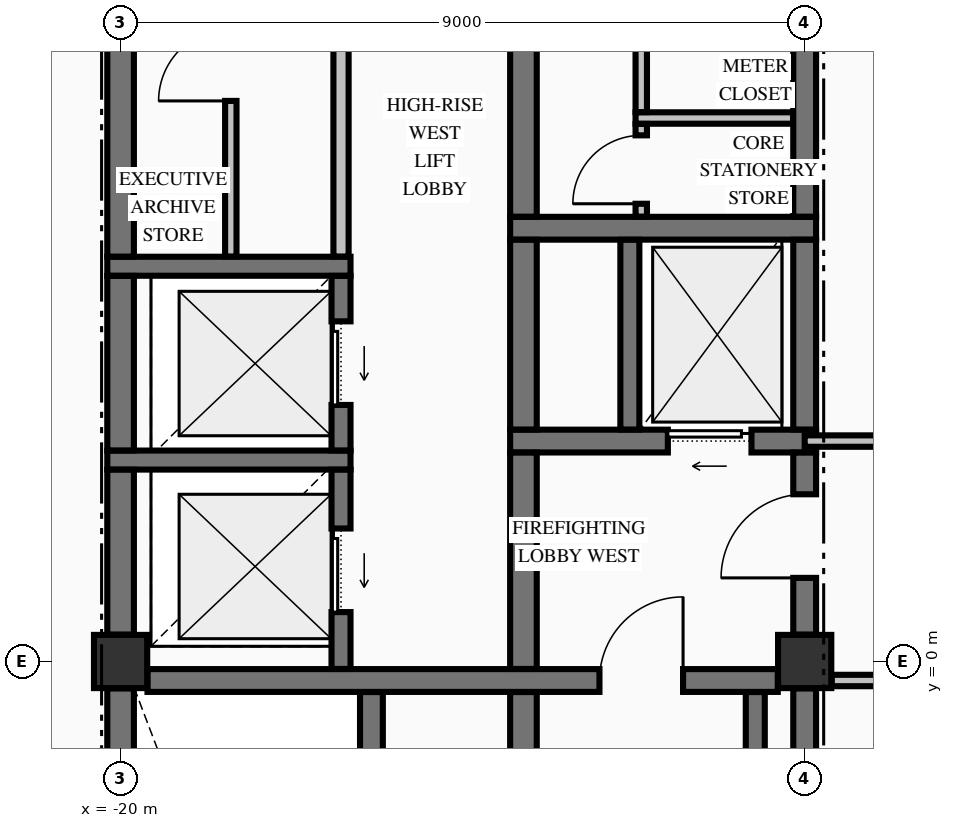
"""IFC4 building model, lengths in metres.
Left out: names, types, materials, properties, quantities, classifications, styles, units other than length and angle.
Written with IfcOpenShell. Run it as: python <this file> out.ifc"""

import sys

from ifc_helpers import new_model, si_unit, direction, frame, frame_2d, origin, origin_2d, place, context, subcontext, project, spatial, rectangle, extrude, element, fill, save


model = new_model("IFC4")
c1 = context("Model", 3, precision=1e-05, world=origin(), true_north=direction((0.0, 1.0)))
c2 = subcontext(c1, "Body", "Model", "MODEL_VIEW")
j1 = project(units=[si_unit("LENGTHUNIT", "METRE"), si_unit("PLANEANGLEUNIT", "RADIAN")], contexts=[c1])
p1 = place(None, origin())
s1 = spatial("IfcSite", under=j1, at=p1, CompositionType="ELEMENT")
p2 = place(p1, origin())
s2 = spatial("IfcBuilding", under=s1, at=p2, CompositionType="ELEMENT")
p3 = place(p2, frame((0.0, 0.0, 274.32)))
s3 = spatial("IfcBuildingStorey", under=s2, at=p3, CompositionType="ELEMENT", Elevation=274.32)
for number, where, z_axis, x_axis in (
    (1, (-11.0, 0.0, -0.25), (0.0, 0.0, 1.0), (1.0, 0.0, 0.0)),
    (2, (-20.0, 0.0, -0.25), (0.0, 0.0, 1.0), (1.0, 0.0, 0.0)),
):
    element("IfcColumn", number, at=place(p3, frame(where, z_axis=z_axis, x_axis=x_axis)), inside=s3, PredefinedType="COLUMN", context=c2, shape_type="SweptSolid", body=[
        extrude(rectangle(XDim=0.7, YDim=0.7, at=origin_2d()), origin(), (0.0, 0.0, 1.0), 3.565),
    ])
p4 = place(p3, frame((-19.646, -0.25, 0.0), z_axis=(0.0, 0.0, 1.0), x_axis=(1.0, 0.0, 0.0)))
e3 = element("IfcWall", 3, at=p4, inside=s3, PredefinedType="SHEAR", context=c2, shape_type="SweptSolid", body=[
    extrude(rectangle(XDim=8.292, YDim=0.3, at=frame_2d((4.146, 0.0))), origin(), (0.0, 0.0, 1.0), 3.315),
])
p5 = place(p4, frame((5.946, 0.0, 0.0)))
e4 = element("IfcOpeningElement", 4, at=p5, cuts=e3, PredefinedType="OPENING", context=c2, shape_type="SweptSolid", body=[
    extrude(rectangle(XDim=1.1, YDim=2.15, at=frame_2d((0.55, 1.075))), frame((0.0, 0.16, 0.0), z_axis=(0.0, -1.0, 0.0), x_axis=(1.0, 0.0, 0.0)), (0.0, 0.0, 1.0), 0.32),
])
p6 = place(p3, frame((-20.175, 2.65, 0.0), z_axis=(0.0, 0.0, 1.0), x_axis=(1.0, 0.0, 0.0)))
e5 = element("IfcWall", 5, at=p6, inside=s3, PredefinedType="SOLIDWALL", context=c2, shape_type="SweptSolid", body=[
    extrude(rectangle(XDim=3.2, YDim=0.25, at=frame_2d((1.6, 0.0))), origin(), (0.0, 0.0, 1.0), 3.315),
])
p7 = place(p3, frame((-14.875, 2.9, 0.0), z_axis=(0.0, 0.0, 1.0), x_axis=(1.0, 0.0, 0.0)))
e6 = element("IfcWall", 6, at=p7, inside=s3, PredefinedType="SHEAR", context=c2, shape_type="SweptSolid", body=[
    extrude(rectangle(XDim=4.025, YDim=0.3, at=frame_2d((2.012, 0.0))), origin(), (0.0, 0.0, 1.0), 3.315),
])
p8 = place(p7, frame((2.075, 0.0, 0.0)))
e7 = element("IfcOpeningElement", 7, at=p8, cuts=e6, PredefinedType="OPENING", context=c2, shape_type="SweptSolid", body=[
    extrude(rectangle(XDim=1.1, YDim=2.2, at=frame_2d((0.55, 1.1))), frame((0.0, 0.16, 0.0), z_axis=(0.0, -1.0, 0.0), x_axis=(1.0, 0.0, 0.0)), (0.0, 0.0, 1.0), 0.32),
])
p9 = place(p3, frame((-20.175, 5.2, 0.0), z_axis=(0.0, 0.0, 1.0), x_axis=(1.0, 0.0, 0.0)))
e8 = element("IfcWall", 8, at=p9, inside=s3, PredefinedType="SOLIDWALL", context=c2, shape_type="SweptSolid", body=[
    extrude(rectangle(XDim=3.2, YDim=0.25, at=frame_2d((1.6, 0.0))), origin(), (0.0, 0.0, 1.0), 3.315),
])
p10 = place(p3, frame((-14.875, 5.7, 0.0), z_axis=(0.0, 0.0, 1.0), x_axis=(1.0, 0.0, 0.0)))
e9 = element("IfcWall", 9, at=p10, inside=s3, PredefinedType="SHEAR", context=c2, shape_type="SweptSolid", body=[
    extrude(rectangle(XDim=4.025, YDim=0.3, at=frame_2d((2.012, 0.0))), origin(), (0.0, 0.0, 1.0), 3.315),
])
p11 = place(p3, frame((-10.644, -0.25, 0.0), z_axis=(0.0, 0.0, 1.0), x_axis=(1.0, 0.0, 0.0)))
e10 = element("IfcWall", 10, at=p11, inside=s3, PredefinedType="PARTITIONING", context=c2, shape_type="SweptSolid", body=[
    extrude(rectangle(XDim=21.288, YDim=0.15, at=frame_2d((10.644, 0.0))), origin(), (0.0, 0.0, 1.0), 3.315),
])
p12 = place(p11, frame((8.294, 0.0, 0.0)))
e11 = element("IfcOpeningElement", 11, at=p12, cuts=e10, PredefinedType="OPENING", context=c2, shape_type="SweptSolid", body=[
    extrude(rectangle(XDim=1.1, YDim=2.15, at=frame_2d((0.55, 1.075))), frame((0.0, 0.085, 0.0), z_axis=(0.0, -1.0, 0.0), x_axis=(1.0, 0.0, 0.0)), (0.0, 0.0, 1.0), 0.17),
])
p13 = place(p11, frame((3.169, 0.0, 0.0)))
e12 = element("IfcOpeningElement", 12, at=p13, cuts=e10, PredefinedType="OPENING", context=c2, shape_type="SweptSolid", body=[
    extrude(rectangle(XDim=1.05, YDim=2.15, at=frame_2d((0.525, 1.075))), frame((0.0, 0.085, 0.0), z_axis=(0.0, -1.0, 0.0), x_axis=(1.0, 0.0, 0.0)), (0.0, 0.0, 1.0), 0.17),
])
p14 = place(p11, frame((15.319, 0.0, 0.0)))
e13 = element("IfcOpeningElement", 13, at=p14, cuts=e10, PredefinedType="OPENING", context=c2, shape_type="SweptSolid", body=[
    extrude(rectangle(XDim=0.95, YDim=2.15, at=frame_2d((0.475, 1.075))), frame((0.0, 0.085, 0.0), z_axis=(0.0, -1.0, 0.0), x_axis=(1.0, 0.0, 0.0)), (0.0, 0.0, 1.0), 0.17),
])
p15 = place(p3, frame((-11.0, 2.9, 0.0), z_axis=(0.0, 0.0, 1.0), x_axis=(1.0, 0.0, 0.0)))
e14 = element("IfcWall", 14, at=p15, inside=s3, PredefinedType="PARTITIONING", context=c2, shape_type="SweptSolid", body=[
    extrude(rectangle(XDim=22.0, YDim=0.15, at=frame_2d((11.0, 0.0))), origin(), (0.0, 0.0, 1.0), 3.315),
])
p16 = place(p15, frame((8.65, 0.0, 0.0)))
e15 = element("IfcOpeningElement", 15, at=p16, cuts=e14, PredefinedType="OPENING", context=c2, shape_type="SweptSolid", body=[
    extrude(rectangle(XDim=1.1, YDim=2.15, at=frame_2d((0.55, 1.075))), frame((0.0, 0.085, 0.0), z_axis=(0.0, -1.0, 0.0), x_axis=(1.0, 0.0, 0.0)), (0.0, 0.0, 1.0), 0.17),
])
p17 = place(p15, frame((3.525, 0.0, 0.0)))
e16 = element("IfcOpeningElement", 16, at=p17, cuts=e14, PredefinedType="OPENING", context=c2, shape_type="SweptSolid", body=[
    extrude(rectangle(XDim=1.05, YDim=2.15, at=frame_2d((0.525, 1.075))), frame((0.0, 0.085, 0.0), z_axis=(0.0, -1.0, 0.0), x_axis=(1.0, 0.0, 0.0)), (0.0, 0.0, 1.0), 0.17),
])
p18 = place(p15, frame((12.225, 0.0, 0.0)))
e17 = element("IfcOpeningElement", 17, at=p18, cuts=e14, PredefinedType="OPENING", context=c2, shape_type="SweptSolid", body=[
    extrude(rectangle(XDim=0.95, YDim=2.15, at=frame_2d((0.475, 1.075))), frame((0.0, 0.085, 0.0), z_axis=(0.0, -1.0, 0.0), x_axis=(1.0, 0.0, 0.0)), (0.0, 0.0, 1.0), 0.17),
])
p19 = place(p15, frame((18.075, 0.0, 0.0)))
e18 = element("IfcOpeningElement", 18, at=p19, cuts=e14, PredefinedType="OPENING", context=c2, shape_type="SweptSolid", body=[
    extrude(rectangle(XDim=0.95, YDim=2.15, at=frame_2d((0.475, 1.075))), frame((0.0, 0.085, 0.0), z_axis=(0.0, -1.0, 0.0), x_axis=(1.0, 0.0, 0.0)), (0.0, 0.0, 1.0), 0.17),
])
p20 = place(p3, frame((-13.225, 7.15, 0.0), z_axis=(0.0, 0.0, 1.0), x_axis=(1.0, 0.0, 0.0)))
e19 = element("IfcWall", 19, at=p20, inside=s3, PredefinedType="PARTITIONING", context=c2, shape_type="SweptSolid", body=[
    extrude(rectangle(XDim=2.072, YDim=0.15, at=frame_2d((1.036, 0.0))), origin(), (0.0, 0.0, 1.0), 3.315),
])
p21 = place(p3, frame((-20.0, -9.596, 0.0), z_axis=(0.0, 0.0, 1.0), x_axis=(0.0, 1.0, 0.0)))
e20 = element("IfcWall", 20, at=p21, inside=s3, PredefinedType="SHEAR", context=c2, shape_type="SweptSolid", body=[
    extrude(rectangle(XDim=9.242, YDim=0.35, at=frame_2d((4.621, 0.0))), origin(), (0.0, 0.0, 1.0), 3.315),
])
p22 = place(p3, frame((-20.0, 0.354, 0.0), z_axis=(0.0, 0.0, 1.0), x_axis=(0.0, 1.0, 0.0)))
e21 = element("IfcWall", 21, at=p22, inside=s3, PredefinedType="SHEAR", context=c2, shape_type="SweptSolid", body=[
    extrude(rectangle(XDim=2.169, YDim=0.35, at=frame_2d((1.084, 0.0))), origin(), (0.0, 0.0, 1.0), 3.315),
])
p23 = place(p3, frame((-20.0, 2.777, 0.0), z_axis=(0.0, 0.0, 1.0), x_axis=(0.0, 1.0, 0.0)))
e22 = element("IfcWall", 22, at=p23, inside=s3, PredefinedType="SHEAR", context=c2, shape_type="SweptSolid", body=[
    extrude(rectangle(XDim=2.296, YDim=0.35, at=frame_2d((1.148, 0.0))), origin(), (0.0, 0.0, 1.0), 3.315),
])
p24 = place(p3, frame((-20.0, 5.327, 0.0), z_axis=(0.0, 0.0, 1.0), x_axis=(0.0, 1.0, 0.0)))
e23 = element("IfcWall", 23, at=p24, inside=s3, PredefinedType="SHEAR", context=c2, shape_type="SweptSolid", body=[
    extrude(rectangle(XDim=4.819, YDim=0.35, at=frame_2d((2.41, 0.0))), origin(), (0.0, 0.0, 1.0), 3.315),
])
p25 = place(p3, frame((-17.1, -0.098, 0.0), z_axis=(0.0, 0.0, 1.0), x_axis=(0.0, 1.0, 0.0)))
e24 = element("IfcWall", 24, at=p25, inside=s3, PredefinedType="SOLIDWALL", context=c2, shape_type="SweptSolid", body=[
    extrude(rectangle(XDim=2.621, YDim=0.25, at=frame_2d((1.311, 0.0))), origin(), (0.0, 0.0, 1.0), 3.315),
])
p26 = place(p25, frame((0.748, 0.0, 0.0)))
e25 = element("IfcOpeningElement", 25, at=p26, cuts=e24, PredefinedType="OPENING", context=c2, shape_type="SweptSolid", body=[
    extrude(rectangle(XDim=1.1, YDim=2.2, at=frame_2d((0.55, 1.1))), frame((0.0, 0.135, 0.0), z_axis=(0.0, -1.0, 0.0), x_axis=(1.0, 0.0, 0.0)), (0.0, 0.0, 1.0), 0.27),
])
p27 = place(p3, frame((-17.1, 2.777, 0.0), z_axis=(0.0, 0.0, 1.0), x_axis=(0.0, 1.0, 0.0)))
e26 = element("IfcWall", 26, at=p27, inside=s3, PredefinedType="SOLIDWALL", context=c2, shape_type="SweptSolid", body=[
    extrude(rectangle(XDim=2.296, YDim=0.25, at=frame_2d((1.148, 0.0))), origin(), (0.0, 0.0, 1.0), 3.315),
])
p28 = place(p27, frame((0.598, 0.0, 0.0)))
e27 = element("IfcOpeningElement", 27, at=p28, cuts=e26, PredefinedType="OPENING", context=c2, shape_type="SweptSolid", body=[
    extrude(rectangle(XDim=1.1, YDim=2.2, at=frame_2d((0.55, 1.1))), frame((0.0, 0.135, 0.0), z_axis=(0.0, -1.0, 0.0), x_axis=(1.0, 0.0, 0.0)), (0.0, 0.0, 1.0), 0.27),
])
p29 = place(p3, frame((-16.7, -9.773, 0.0), z_axis=(0.0, 0.0, 1.0), x_axis=(0.0, 1.0, 0.0)))
e28 = element("IfcWall", 28, at=p29, inside=s3, PredefinedType="SHEAR", context=c2, shape_type="SweptSolid", body=[
    extrude(rectangle(XDim=9.371, YDim=0.3, at=frame_2d((4.686, 0.0))), origin(), (0.0, 0.0, 1.0), 3.315),
])
p30 = place(p3, frame((-14.7, -9.773, 0.0), z_axis=(0.0, 0.0, 1.0), x_axis=(0.0, 1.0, 0.0)))
e29 = element("IfcWall", 29, at=p30, inside=s3, PredefinedType="SHEAR", context=c2, shape_type="SweptSolid", body=[
    extrude(rectangle(XDim=9.371, YDim=0.35, at=frame_2d((4.686, 0.0))), origin(), (0.0, 0.0, 1.0), 3.315),
])
p31 = place(p3, frame((-14.7, -0.098, 0.0), z_axis=(0.0, 0.0, 1.0), x_axis=(0.0, 1.0, 0.0)))
e30 = element("IfcWall", 30, at=p31, inside=s3, PredefinedType="SHEAR", context=c2, shape_type="SweptSolid", body=[
    extrude(rectangle(XDim=2.846, YDim=0.35, at=frame_2d((1.423, 0.0))), origin(), (0.0, 0.0, 1.0), 3.315),
])
p32 = place(p3, frame((-14.7, 3.052, 0.0), z_axis=(0.0, 0.0, 1.0), x_axis=(0.0, 1.0, 0.0)))
e31 = element("IfcWall", 31, at=p32, inside=s3, PredefinedType="SHEAR", context=c2, shape_type="SweptSolid", body=[
    extrude(rectangle(XDim=2.496, YDim=0.35, at=frame_2d((1.248, 0.0))), origin(), (0.0, 0.0, 1.0), 3.315),
])
p33 = place(p3, frame((-14.7, 5.852, 0.0), z_axis=(0.0, 0.0, 1.0), x_axis=(0.0, 1.0, 0.0)))
e32 = element("IfcWall", 32, at=p33, inside=s3, PredefinedType="SHEAR", context=c2, shape_type="SweptSolid", body=[
    extrude(rectangle(XDim=4.471, YDim=0.35, at=frame_2d((2.235, 0.0))), origin(), (0.0, 0.0, 1.0), 3.315),
])
p34 = place(p3, frame((-13.3, 3.052, 0.0), z_axis=(0.0, 0.0, 1.0), x_axis=(0.0, 1.0, 0.0)))
e33 = element("IfcWall", 33, at=p34, inside=s3, PredefinedType="SOLIDWALL", context=c2, shape_type="SweptSolid", body=[
    extrude(rectangle(XDim=2.496, YDim=0.25, at=frame_2d((1.248, 0.0))), origin(), (0.0, 0.0, 1.0), 3.315),
])
p35 = place(p3, frame((-11.65, -9.798, 0.0), z_axis=(0.0, 0.0, 1.0), x_axis=(0.0, 1.0, 0.0)))
e34 = element("IfcWall", 34, at=p35, inside=s3, PredefinedType="SOLIDWALL", context=c2, shape_type="SweptSolid", body=[
    extrude(rectangle(XDim=9.396, YDim=0.25, at=frame_2d((4.698, 0.0))), origin(), (0.0, 0.0, 1.0), 3.315),
])
p36 = place(p3, frame((-11.0, -9.596, 0.0), z_axis=(0.0, 0.0, 1.0), x_axis=(0.0, 1.0, 0.0)))
e35 = element("IfcWall", 35, at=p36, inside=s3, PredefinedType="SHEAR", context=c2, shape_type="SweptSolid", body=[
    extrude(rectangle(XDim=9.242, YDim=0.3, at=frame_2d((4.621, 0.0))), origin(), (0.0, 0.0, 1.0), 3.315),
])
p37 = place(p3, frame((-11.0, 0.354, 0.0), z_axis=(0.0, 0.0, 1.0), x_axis=(0.0, 1.0, 0.0)))
e36 = element("IfcWall", 36, at=p37, inside=s3, PredefinedType="SHEAR", context=c2, shape_type="SweptSolid", body=[
    extrude(rectangle(XDim=2.394, YDim=0.3, at=frame_2d((1.197, 0.0))), origin(), (0.0, 0.0, 1.0), 3.315),
])
p38 = place(p37, frame((0.746, 0.0, 0.0)))
e37 = element("IfcOpeningElement", 37, at=p38, cuts=e36, PredefinedType="OPENING", context=c2, shape_type="SweptSolid", body=[
    extrude(rectangle(XDim=1.1, YDim=2.15, at=frame_2d((0.55, 1.075))), frame((0.0, 0.16, 0.0), z_axis=(0.0, -1.0, 0.0), x_axis=(1.0, 0.0, 0.0)), (0.0, 0.0, 1.0), 0.32),
])
p39 = place(p3, frame((-11.0, 3.052, 0.0), z_axis=(0.0, 0.0, 1.0), x_axis=(0.0, 1.0, 0.0)))
e38 = element("IfcWall", 38, at=p39, inside=s3, PredefinedType="SHEAR", context=c2, shape_type="SweptSolid", body=[
    extrude(rectangle(XDim=2.496, YDim=0.3, at=frame_2d((1.248, 0.0))), origin(), (0.0, 0.0, 1.0), 3.315),
])
p40 = place(p3, frame((-11.0, 5.852, 0.0), z_axis=(0.0, 0.0, 1.0), x_axis=(0.0, 1.0, 0.0)))
e39 = element("IfcWall", 39, at=p40, inside=s3, PredefinedType="SHEAR", context=c2, shape_type="SweptSolid", body=[
    extrude(rectangle(XDim=4.294, YDim=0.3, at=frame_2d((2.147, 0.0))), origin(), (0.0, 0.0, 1.0), 3.315),
])
p41 = place(p3, frame((-18.55, 5.328, 0.0), z_axis=(0.0, 0.0, 1.0), x_axis=(0.0, 1.0, 0.0)))
e40 = element("IfcWall", 40, at=p41, inside=s3, PredefinedType="PARTITIONING", context=c2, shape_type="SweptSolid", body=[
    extrude(rectangle(XDim=4.994, YDim=0.15, at=frame_2d((2.497, 0.0))), origin(), (0.0, 0.0, 1.0), 3.315),
])
p42 = place(p41, frame((2.047, 0.0, 0.0)))
e41 = element("IfcOpeningElement", 41, at=p42, cuts=e40, PredefinedType="OPENING", context=c2, shape_type="SweptSolid", body=[
    extrude(rectangle(XDim=0.95, YDim=2.15, at=frame_2d((0.475, 1.075))), frame((0.0, 0.085, 0.0), z_axis=(0.0, -1.0, 0.0), x_axis=(1.0, 0.0, 0.0)), (0.0, 0.0, 1.0), 0.17),
])
p43 = place(p3, frame((-17.1, 5.328, 0.0), z_axis=(0.0, 0.0, 1.0), x_axis=(0.0, 1.0, 0.0)))
e42 = element("IfcWall", 42, at=p43, inside=s3, PredefinedType="PARTITIONING", context=c2, shape_type="SweptSolid", body=[
    extrude(rectangle(XDim=4.994, YDim=0.2, at=frame_2d((2.497, 0.0))), origin(), (0.0, 0.0, 1.0), 3.315),
])
p44 = place(p3, frame((-13.15, 5.853, 0.0), z_axis=(0.0, 0.0, 1.0), x_axis=(0.0, 1.0, 0.0)))
e43 = element("IfcWall", 43, at=p44, inside=s3, PredefinedType="PARTITIONING", context=c2, shape_type="SweptSolid", body=[
    extrude(rectangle(XDim=1.219, YDim=0.15, at=frame_2d((0.609, 0.0))), origin(), (0.0, 0.0, 1.0), 3.315),
])
p45 = place(p44, frame((0.169, 0.0, 0.0)))
e44 = element("IfcOpeningElement", 44, at=p45, cuts=e43, PredefinedType="OPENING", context=c2, shape_type="SweptSolid", body=[
    extrude(rectangle(XDim=0.9, YDim=2.15, at=frame_2d((0.45, 1.075))), frame((0.0, 0.085, 0.0), z_axis=(0.0, -1.0, 0.0), x_axis=(1.0, 0.0, 0.0)), (0.0, 0.0, 1.0), 0.17),
])
p46 = place(p3, frame((-13.15, 7.228, 0.0), z_axis=(0.0, 0.0, 1.0), x_axis=(0.0, 1.0, 0.0)))
e45 = element("IfcWall", 45, at=p46, inside=s3, PredefinedType="PARTITIONING", context=c2, shape_type="SweptSolid", body=[
    extrude(rectangle(XDim=3.119, YDim=0.15, at=frame_2d((1.56, 0.0))), origin(), (0.0, 0.0, 1.0), 3.315),
])
p47 = place(p46, frame((1.097, 0.0, 0.0)))
e46 = element("IfcOpeningElement", 46, at=p47, cuts=e45, PredefinedType="OPENING", context=c2, shape_type="SweptSolid", body=[
    extrude(rectangle(XDim=0.95, YDim=2.15, at=frame_2d((0.475, 1.075))), frame((0.0, 0.085, 0.0), z_axis=(0.0, -1.0, 0.0), x_axis=(1.0, 0.0, 0.0)), (0.0, 0.0, 1.0), 0.17),
])
p48 = place(p5, origin())
e47 = element("IfcDoor", 47, at=p48, inside=s3, OperationType="SINGLE_SWING_RIGHT", PredefinedType="DOOR", context=c2, shape_type="SweptSolid", body=[
    extrude(rectangle(XDim=1.1, YDim=2.15, at=frame_2d((0.55, 1.075))), frame((0.0, 0.025, 0.0), z_axis=(0.0, -1.0, 0.0), x_axis=(1.0, 0.0, 0.0)), (0.0, 0.0, 1.0), 0.05),
])
fill(e4, e47)
p49 = place(p38, origin())
e48 = element("IfcDoor", 48, at=p49, inside=s3, OperationType="SINGLE_SWING_LEFT", PredefinedType="DOOR", context=c2, shape_type="SweptSolid", body=[
    extrude(rectangle(XDim=1.1, YDim=2.15, at=frame_2d((0.55, 1.075))), frame((0.0, 0.025, 0.0), z_axis=(0.0, -1.0, 0.0), x_axis=(1.0, 0.0, 0.0)), (0.0, 0.0, 1.0), 0.05),
])
fill(e37, e48)
p50 = place(p8, origin())
e49 = element("IfcDoor", 49, at=p50, inside=s3, OperationType="SLIDING_TO_LEFT", PredefinedType="DOOR", context=c2, shape_type="SweptSolid", body=[
    extrude(rectangle(XDim=1.1, YDim=2.2, at=frame_2d((0.55, 1.1))), frame((0.0, 0.025, 0.0), z_axis=(0.0, -1.0, 0.0), x_axis=(1.0, 0.0, 0.0)), (0.0, 0.0, 1.0), 0.05),
])
fill(e7, e49)
p51 = place(p45, origin())
e50 = element("IfcDoor", 50, at=p51, inside=s3, OperationType="SINGLE_SWING_LEFT", PredefinedType="DOOR", context=c2, shape_type="SweptSolid", body=[
    extrude(rectangle(XDim=0.9, YDim=2.15, at=frame_2d((0.45, 1.075))), frame((0.0, 0.025, 0.0), z_axis=(0.0, -1.0, 0.0), x_axis=(1.0, 0.0, 0.0)), (0.0, 0.0, 1.0), 0.05),
])
fill(e44, e50)
p52 = place(p26, origin())
e51 = element("IfcDoor", 51, at=p52, inside=s3, OperationType="SLIDING_TO_LEFT", PredefinedType="DOOR", context=c2, shape_type="SweptSolid", body=[
    extrude(rectangle(XDim=1.1, YDim=2.2, at=frame_2d((0.55, 1.1))), frame((0.0, 0.025, 0.0), z_axis=(0.0, -1.0, 0.0), x_axis=(1.0, 0.0, 0.0)), (0.0, 0.0, 1.0), 0.05),
])
fill(e25, e51)
p53 = place(p28, origin())
e52 = element("IfcDoor", 52, at=p53, inside=s3, OperationType="SLIDING_TO_LEFT", PredefinedType="DOOR", context=c2, shape_type="SweptSolid", body=[
    extrude(rectangle(XDim=1.1, YDim=2.2, at=frame_2d((0.55, 1.1))), frame((0.0, 0.025, 0.0), z_axis=(0.0, -1.0, 0.0), x_axis=(1.0, 0.0, 0.0)), (0.0, 0.0, 1.0), 0.05),
])
fill(e27, e52)
p54 = place(p42, origin())
e53 = element("IfcDoor", 53, at=p54, inside=s3, OperationType="SINGLE_SWING_LEFT", PredefinedType="DOOR", context=c2, shape_type="SweptSolid", body=[
    extrude(rectangle(XDim=0.95, YDim=2.15, at=frame_2d((0.475, 1.075))), frame((0.0, 0.025, 0.0), z_axis=(0.0, -1.0, 0.0), x_axis=(1.0, 0.0, 0.0)), (0.0, 0.0, 1.0), 0.05),
])
fill(e41, e53)
save(model, sys.argv[1])
